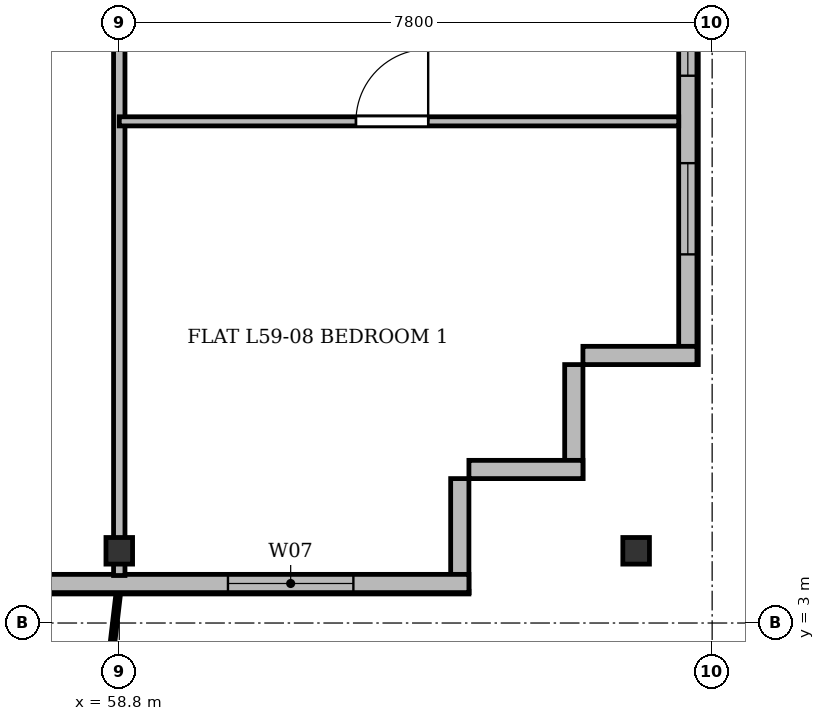
"""IFC4 building model, lengths in metres.
Left out: names, types, materials, properties, quantities, classifications, styles, units other than length and angle.
Written with IfcOpenShell. Run it as: python <this file> out.ifc"""

import sys

from ifc_helpers import new_model, si_unit, direction, frame, frame_2d, origin, origin_2d, place, context, subcontext, project, spatial, rectangle, i_section, extrude, source, transform, mapped, element, fill, save


model = new_model("IFC4")
c1 = context("Model", 3, precision=1e-05, world=origin(), true_north=direction((0.0, 1.0)))
c2 = subcontext(c1, "Body", "Model", "MODEL_VIEW")
j1 = project(units=[si_unit("LENGTHUNIT", "METRE"), si_unit("PLANEANGLEUNIT", "RADIAN")], contexts=[c1])
p1 = place(None, origin())
s1 = spatial("IfcSite", under=j1, at=p1, CompositionType="ELEMENT")
p2 = place(p1, origin())
s2 = spatial("IfcBuilding", under=s1, at=p2, CompositionType="ELEMENT")
p3 = place(p2, frame((0.0, 0.0, 226.5)))
s3 = spatial("IfcBuildingStorey", under=s2, at=p3, CompositionType="ELEMENT", Elevation=226.5)
m1 = source(origin(), c2, "Body", "SweptSolid", [
    extrude(i_section(OverallWidth=0.35, OverallDepth=0.35, WebThickness=0.018, FlangeThickness=0.028, at=origin_2d()), origin(), (0.0, 0.0, 1.0), 3.6),
])
for number, where, z_axis, x_axis in (
    (1, (58.8, 3.95, 0.0), (0.0, 0.0, 1.0), (1.0, 0.0, 0.0)),
    (2, (65.6, 3.95, 0.0), (0.0, 0.0, 1.0), (1.0, 0.0, 0.0)),
):
    element("IfcColumn", number, at=place(p3, frame(where, z_axis=z_axis, x_axis=x_axis)), inside=s3, PredefinedType="COLUMN", context=c2, shape_type="MappedRepresentation", body=[
        mapped(m1, transform((0.0, 0.0, 0.0), x_axis=(1.0, 0.0, 0.0), y_axis=(0.0, 1.0, 0.0), z_axis=(0.0, 0.0, 1.0), scale=1.0)),
    ])
p4 = place(p3, frame((66.28, 45.5, 0.0), z_axis=(0.0, 0.0, 1.0), x_axis=(0.0, -1.0, 0.0)))
e3 = element("IfcWall", 3, at=p4, inside=s3, PredefinedType="SOLIDWALL", context=c2, shape_type="SweptSolid", body=[
    extrude(rectangle(XDim=39.1, YDim=0.24, at=frame_2d((19.55, 0.0))), origin(), (0.0, 0.0, 1.0), 3.36),
])
p5 = place(p4, frame((36.45, 0.0, 0.92)))
e4 = element("IfcOpeningElement", 4, at=p5, cuts=e3, PredefinedType="OPENING", context=c2, shape_type="SweptSolid", body=[
    extrude(rectangle(XDim=1.2, YDim=1.65, at=frame_2d((0.6, 0.825))), frame((0.0, 0.13, 0.0), z_axis=(0.0, -1.0, 0.0), x_axis=(1.0, 0.0, 0.0)), (0.0, 0.0, 1.0), 0.26),
])
p6 = place(p4, frame((32.9, 0.0, 0.92)))
e5 = element("IfcOpeningElement", 5, at=p6, cuts=e3, PredefinedType="OPENING", context=c2, shape_type="SweptSolid", body=[
    extrude(rectangle(XDim=2.4, YDim=2.1, at=frame_2d((1.2, 1.05))), frame((0.0, 0.13, 0.0), z_axis=(0.0, -1.0, 0.0), x_axis=(1.0, 0.0, 0.0)), (0.0, 0.0, 1.0), 0.26),
])
p7 = place(p4, frame((28.7, 0.0, 0.92)))
e6 = element("IfcOpeningElement", 6, at=p7, cuts=e3, PredefinedType="OPENING", context=c2, shape_type="SweptSolid", body=[
    extrude(rectangle(XDim=2.4, YDim=2.1, at=frame_2d((1.2, 1.05))), frame((0.0, 0.13, 0.0), z_axis=(0.0, -1.0, 0.0), x_axis=(1.0, 0.0, 0.0)), (0.0, 0.0, 1.0), 0.26),
])
p8 = place(p4, frame((21.5, 0.0, 0.92)))
e7 = element("IfcOpeningElement", 7, at=p8, cuts=e3, PredefinedType="OPENING", context=c2, shape_type="SweptSolid", body=[
    extrude(rectangle(XDim=2.4, YDim=2.1, at=frame_2d((1.2, 1.05))), frame((0.0, 0.13, 0.0), z_axis=(0.0, -1.0, 0.0), x_axis=(1.0, 0.0, 0.0)), (0.0, 0.0, 1.0), 0.26),
])
p9 = place(p4, frame((7.5, 0.0, 0.92)))
e8 = element("IfcOpeningElement", 8, at=p9, cuts=e3, PredefinedType="OPENING", context=c2, shape_type="SweptSolid", body=[
    extrude(rectangle(XDim=2.4, YDim=2.1, at=frame_2d((1.2, 1.05))), frame((0.0, 0.13, 0.0), z_axis=(0.0, -1.0, 0.0), x_axis=(1.0, 0.0, 0.0)), (0.0, 0.0, 1.0), 0.26),
])
p10 = place(p4, frame((4.5, 0.0, 0.92)))
e9 = element("IfcOpeningElement", 9, at=p10, cuts=e3, PredefinedType="OPENING", context=c2, shape_type="SweptSolid", body=[
    extrude(rectangle(XDim=1.2, YDim=1.65, at=frame_2d((0.6, 0.825))), frame((0.0, 0.13, 0.0), z_axis=(0.0, -1.0, 0.0), x_axis=(1.0, 0.0, 0.0)), (0.0, 0.0, 1.0), 0.26),
])
p11 = place(p4, frame((1.15, 0.0, 0.92)))
e10 = element("IfcOpeningElement", 10, at=p11, cuts=e3, PredefinedType="OPENING", context=c2, shape_type="SweptSolid", body=[
    extrude(rectangle(XDim=1.2, YDim=1.65, at=frame_2d((0.6, 0.825))), frame((0.0, 0.13, 0.0), z_axis=(0.0, -1.0, 0.0), x_axis=(1.0, 0.0, 0.0)), (0.0, 0.0, 1.0), 0.26),
])
p12 = place(p3, frame((66.4, 6.52, 0.0), z_axis=(0.0, 0.0, 1.0), x_axis=(-1.0, 0.0, 0.0)))
e11 = element("IfcWall", 11, at=p12, inside=s3, PredefinedType="SOLIDWALL", context=c2, shape_type="SweptSolid", body=[
    extrude(rectangle(XDim=1.5, YDim=0.24, at=frame_2d((0.75, 0.0))), origin(), (0.0, 0.0, 1.0), 2.86),
])
for number, where, z_axis, x_axis in (
    (12, (64.78, 6.4, 0.0), (0.0, 0.0, 1.0), (0.0, -1.0, 0.0)),
    (13, (64.9, 5.02, 0.0), (0.0, 0.0, 1.0), (-1.0, 0.0, 0.0)),
):
    element("IfcWall", number, at=place(p3, frame(where, z_axis=z_axis, x_axis=x_axis)), inside=s3, PredefinedType="SOLIDWALL", context=c2, shape_type="SweptSolid", body=[
        extrude(rectangle(XDim=1.5, YDim=0.24, at=frame_2d((0.75, 0.0))), origin(), (0.0, 0.0, 1.0), 3.36),
    ])
p13 = place(p3, frame((63.28, 4.9, 0.0), z_axis=(0.0, 0.0, 1.0), x_axis=(0.0, -1.0, 0.0)))
e14 = element("IfcWall", 14, at=p13, inside=s3, PredefinedType="SOLIDWALL", context=c2, shape_type="SweptSolid", body=[
    extrude(rectangle(XDim=1.5, YDim=0.24, at=frame_2d((0.75, 0.0))), origin(), (0.0, 0.0, 1.0), 2.91),
])
p14 = place(p3, frame((63.4, 3.52, 0.0), z_axis=(0.0, 0.0, 1.0), x_axis=(-1.0, 0.0, 0.0)))
e15 = element("IfcWall", 15, at=p14, inside=s3, PredefinedType="SOLIDWALL", context=c2, shape_type="SweptSolid", body=[
    extrude(rectangle(XDim=52.4, YDim=0.24, at=frame_2d((26.2, 0.0))), origin(), (0.0, 0.0, 1.0), 3.36),
])
p15 = place(p14, frame((1.52, 0.0, 0.9)))
e16 = element("IfcOpeningElement", 16, at=p15, cuts=e15, PredefinedType="OPENING", context=c2, shape_type="SweptSolid", body=[
    extrude(rectangle(XDim=1.65, YDim=1.85, at=frame_2d((0.825, 0.925))), frame((0.0, 0.13, 0.0), z_axis=(0.0, -1.0, 0.0), x_axis=(1.0, 0.0, 0.0)), (0.0, 0.0, 1.0), 0.26),
])
p16 = place(p14, frame((7.6, 0.0, 0.9)))
e17 = element("IfcOpeningElement", 17, at=p16, cuts=e15, PredefinedType="OPENING", context=c2, shape_type="SweptSolid", body=[
    extrude(rectangle(XDim=1.8, YDim=1.8, at=frame_2d((0.9, 0.9))), frame((0.0, 0.13, 0.0), z_axis=(0.0, -1.0, 0.0), x_axis=(1.0, 0.0, 0.0)), (0.0, 0.0, 1.0), 0.26),
])
p17 = place(p14, frame((13.42, 0.0, 0.0)))
e18 = element("IfcOpeningElement", 18, at=p17, cuts=e15, PredefinedType="OPENING", context=c2, shape_type="SweptSolid", body=[
    extrude(rectangle(XDim=1.2, YDim=2.2, at=frame_2d((0.6, 1.1))), frame((0.0, 0.13, 0.0), z_axis=(0.0, -1.0, 0.0), x_axis=(1.0, 0.0, 0.0)), (0.0, 0.0, 1.0), 0.26),
])
p18 = place(p14, frame((15.25, 0.0, 0.9)))
e19 = element("IfcOpeningElement", 19, at=p18, cuts=e15, PredefinedType="OPENING", context=c2, shape_type="SweptSolid", body=[
    extrude(rectangle(XDim=1.5, YDim=1.75, at=frame_2d((0.75, 0.875))), frame((0.0, 0.13, 0.0), z_axis=(0.0, -1.0, 0.0), x_axis=(1.0, 0.0, 0.0)), (0.0, 0.0, 1.0), 0.26),
])
p19 = place(p14, frame((17.4, 0.0, 0.9)))
e20 = element("IfcOpeningElement", 20, at=p19, cuts=e15, PredefinedType="OPENING", context=c2, shape_type="SweptSolid", body=[
    extrude(rectangle(XDim=2.0, YDim=1.95, at=frame_2d((1.0, 0.975))), frame((0.0, 0.13, 0.0), z_axis=(0.0, -1.0, 0.0), x_axis=(1.0, 0.0, 0.0)), (0.0, 0.0, 1.0), 0.26),
])
p20 = place(p14, frame((20.425, 0.0, 0.9)))
e21 = element("IfcOpeningElement", 21, at=p20, cuts=e15, PredefinedType="OPENING", context=c2, shape_type="SweptSolid", body=[
    extrude(rectangle(XDim=1.65, YDim=1.85, at=frame_2d((0.825, 0.925))), frame((0.0, 0.13, 0.0), z_axis=(0.0, -1.0, 0.0), x_axis=(1.0, 0.0, 0.0)), (0.0, 0.0, 1.0), 0.26),
])
p21 = place(p14, frame((23.65, 0.0, 0.9)))
e22 = element("IfcOpeningElement", 22, at=p21, cuts=e15, PredefinedType="OPENING", context=c2, shape_type="SweptSolid", body=[
    extrude(rectangle(XDim=1.8, YDim=1.8, at=frame_2d((0.9, 0.9))), frame((0.0, 0.13, 0.0), z_axis=(0.0, -1.0, 0.0), x_axis=(1.0, 0.0, 0.0)), (0.0, 0.0, 1.0), 0.26),
])
p22 = place(p14, frame((28.4, 0.0, 0.9)))
e23 = element("IfcOpeningElement", 23, at=p22, cuts=e15, PredefinedType="OPENING", context=c2, shape_type="SweptSolid", body=[
    extrude(rectangle(XDim=2.2, YDim=1.8, at=frame_2d((1.1, 0.9))), frame((0.0, 0.13, 0.0), z_axis=(0.0, -1.0, 0.0), x_axis=(1.0, 0.0, 0.0)), (0.0, 0.0, 1.0), 0.26),
])
p23 = place(p14, frame((33.85, 0.0, 0.9)))
e24 = element("IfcOpeningElement", 24, at=p23, cuts=e15, PredefinedType="OPENING", context=c2, shape_type="SweptSolid", body=[
    extrude(rectangle(XDim=1.5, YDim=1.75, at=frame_2d((0.75, 0.875))), frame((0.0, 0.13, 0.0), z_axis=(0.0, -1.0, 0.0), x_axis=(1.0, 0.0, 0.0)), (0.0, 0.0, 1.0), 0.26),
])
p24 = place(p14, frame((37.2, 0.0, 0.9)))
e25 = element("IfcOpeningElement", 25, at=p24, cuts=e15, PredefinedType="OPENING", context=c2, shape_type="SweptSolid", body=[
    extrude(rectangle(XDim=2.0, YDim=1.95, at=frame_2d((1.0, 0.975))), frame((0.0, 0.13, 0.0), z_axis=(0.0, -1.0, 0.0), x_axis=(1.0, 0.0, 0.0)), (0.0, 0.0, 1.0), 0.26),
])
p25 = place(p14, frame((41.09, 0.0, 0.0)))
e26 = element("IfcOpeningElement", 26, at=p25, cuts=e15, PredefinedType="OPENING", context=c2, shape_type="SweptSolid", body=[
    extrude(rectangle(XDim=1.2, YDim=2.2, at=frame_2d((0.6, 1.1))), frame((0.0, 0.13, 0.0), z_axis=(0.0, -1.0, 0.0), x_axis=(1.0, 0.0, 0.0)), (0.0, 0.0, 1.0), 0.26),
])
p26 = place(p14, frame((43.0, 0.0, 0.9)))
e27 = element("IfcOpeningElement", 27, at=p26, cuts=e15, PredefinedType="OPENING", context=c2, shape_type="SweptSolid", body=[
    extrude(rectangle(XDim=1.8, YDim=1.8, at=frame_2d((0.9, 0.9))), frame((0.0, 0.13, 0.0), z_axis=(0.0, -1.0, 0.0), x_axis=(1.0, 0.0, 0.0)), (0.0, 0.0, 1.0), 0.26),
])
p27 = place(p14, frame((45.75, 0.0, 0.9)))
e28 = element("IfcOpeningElement", 28, at=p27, cuts=e15, PredefinedType="OPENING", context=c2, shape_type="SweptSolid", body=[
    extrude(rectangle(XDim=1.5, YDim=1.75, at=frame_2d((0.75, 0.875))), frame((0.0, 0.13, 0.0), z_axis=(0.0, -1.0, 0.0), x_axis=(1.0, 0.0, 0.0)), (0.0, 0.0, 1.0), 0.26),
])
p28 = place(p14, frame((49.305, 0.0, 0.9)))
e29 = element("IfcOpeningElement", 29, at=p28, cuts=e15, PredefinedType="OPENING", context=c2, shape_type="SweptSolid", body=[
    extrude(rectangle(XDim=1.5, YDim=1.75, at=frame_2d((0.75, 0.875))), frame((0.0, 0.13, 0.0), z_axis=(0.0, -1.0, 0.0), x_axis=(1.0, 0.0, 0.0)), (0.0, 0.0, 1.0), 0.26),
])
p29 = place(p3, frame((58.8, 3.625, 0.0), z_axis=(0.0, 0.0, 1.0), x_axis=(0.0, 1.0, 0.0)))
e30 = element("IfcWall", 30, at=p29, inside=s3, PredefinedType="PARTITIONING", context=c2, shape_type="SweptSolid", body=[
    extrude(rectangle(XDim=27.375, YDim=0.15, at=frame_2d((13.688, 0.0))), origin(), (0.0, 0.0, 1.0), 2.86),
])
p30 = place(p3, frame((58.8, 9.6, 0.0), z_axis=(0.0, 0.0, 1.0), x_axis=(1.0, 0.0, 0.0)))
e31 = element("IfcWall", 31, at=p30, inside=s3, PredefinedType="PARTITIONING", context=c2, shape_type="SweptSolid", body=[
    extrude(rectangle(XDim=7.36, YDim=0.12, at=frame_2d((3.68, 0.0))), origin(), (0.0, 0.0, 1.0), 2.86),
])
p31 = place(p30, frame((3.114, 0.0, 0.0)))
e32 = element("IfcOpeningElement", 32, at=p31, cuts=e31, PredefinedType="OPENING", context=c2, shape_type="SweptSolid", body=[
    extrude(rectangle(XDim=0.95, YDim=2.15, at=frame_2d((0.475, 1.075))), frame((0.0, 0.07, 0.0), z_axis=(0.0, -1.0, 0.0), x_axis=(1.0, 0.0, 0.0)), (0.0, 0.0, 1.0), 0.14),
])
m2 = source(origin(), c2, "Body", "SweptSolid", [
    extrude(rectangle(XDim=1.2, YDim=1.65, at=frame_2d((0.6, 0.825))), frame((0.0, 0.03, 0.0), z_axis=(0.0, -1.0, 0.0), x_axis=(1.0, 0.0, 0.0)), (0.0, 0.0, 1.0), 0.06),
])
p32 = place(p5, origin())
e33 = element("IfcWindow", 33, at=p32, inside=s3, PartitioningType="SINGLE_PANEL", PredefinedType="WINDOW", context=c2, shape_type="MappedRepresentation", body=[
    mapped(m2, transform((0.0, 0.0, 0.0), x_axis=(1.0, 0.0, 0.0), y_axis=(0.0, 1.0, 0.0), z_axis=(0.0, 0.0, 1.0), scale=1.0)),
])
fill(e4, e33)
m3 = source(origin(), c2, "Body", "SweptSolid", [
    extrude(rectangle(XDim=2.4, YDim=2.1, at=frame_2d((1.2, 1.05))), frame((0.0, 0.03, 0.0), z_axis=(0.0, -1.0, 0.0), x_axis=(1.0, 0.0, 0.0)), (0.0, 0.0, 1.0), 0.06),
])
p33 = place(p6, origin())
e34 = element("IfcWindow", 34, at=p33, inside=s3, PartitioningType="SINGLE_PANEL", PredefinedType="WINDOW", context=c2, shape_type="MappedRepresentation", body=[
    mapped(m3, transform((0.0, 0.0, 0.0), x_axis=(1.0, 0.0, 0.0), y_axis=(0.0, 1.0, 0.0), z_axis=(0.0, 0.0, 1.0), scale=1.0)),
])
fill(e5, e34)
m4 = source(origin(), c2, "Body", "SweptSolid", [
    extrude(rectangle(XDim=1.65, YDim=1.85, at=frame_2d((0.825, 0.925))), frame((0.0, 0.03, 0.0), z_axis=(0.0, -1.0, 0.0), x_axis=(1.0, 0.0, 0.0)), (0.0, 0.0, 1.0), 0.06),
])
p34 = place(p15, origin())
e35 = element("IfcWindow", 35, at=p34, inside=s3, PartitioningType="SINGLE_PANEL", PredefinedType="WINDOW", context=c2, shape_type="MappedRepresentation", body=[
    mapped(m4, transform((0.0, 0.0, 0.0), x_axis=(1.0, 0.0, 0.0), y_axis=(0.0, 1.0, 0.0), z_axis=(0.0, 0.0, 1.0), scale=1.0)),
])
fill(e16, e35)
m5 = source(origin(), c2, "Body", "SweptSolid", [
    extrude(rectangle(XDim=0.95, YDim=2.15, at=frame_2d((0.475, 1.075))), frame((0.0, 0.025, 0.0), z_axis=(0.0, -1.0, 0.0), x_axis=(1.0, 0.0, 0.0)), (0.0, 0.0, 1.0), 0.05),
])
p35 = place(p31, origin())
e36 = element("IfcDoor", 36, at=p35, inside=s3, OperationType="SINGLE_SWING_RIGHT", PredefinedType="DOOR", context=c2, shape_type="MappedRepresentation", body=[
    mapped(m5, transform((0.0, 0.0, 0.0), x_axis=(1.0, 0.0, 0.0), y_axis=(0.0, 1.0, 0.0), z_axis=(0.0, 0.0, 1.0), scale=1.0)),
])
fill(e32, e36)
save(model, sys.argv[1])
